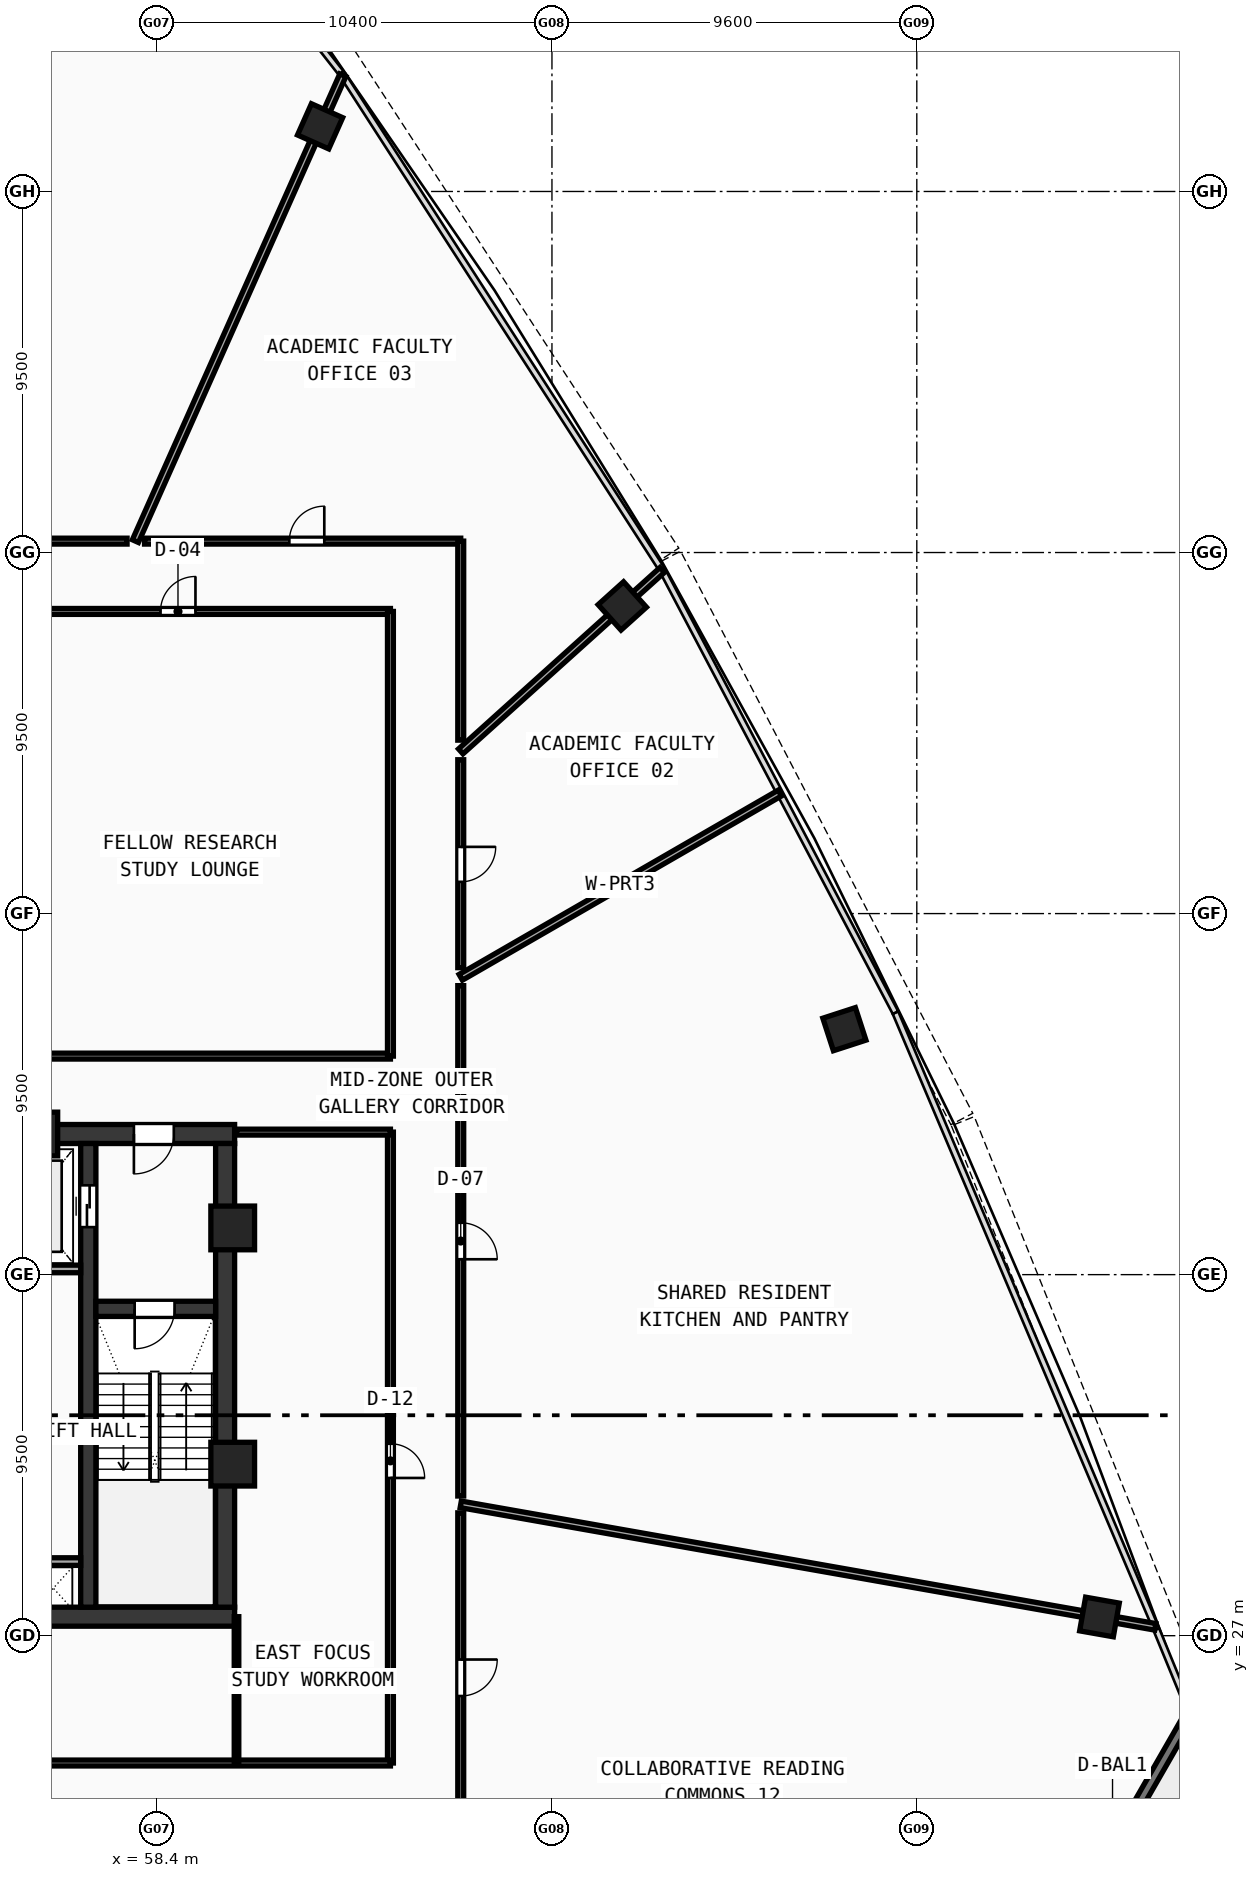
"""IFC4 building model, lengths in metres.
Left out: names, types, materials, properties, quantities, classifications, styles, units other than length and angle.
Written with IfcOpenShell. Run it as: python <this file> out.ifc"""

import sys

from ifc_helpers import new_model, si_unit, direction, frame, frame_2d, origin, origin_with_axes, origin_2d, place, context, subcontext, project, spatial, rectangle, hollow_rectangle, extrude, source, transform, mapped, element, fill, save


model = new_model("IFC4")
c1 = context("Model", 3, precision=1e-05, world=origin(), true_north=direction((0.0, 1.0)))
c2 = subcontext(c1, "Body", "Model", "MODEL_VIEW")
j1 = project(units=[si_unit("LENGTHUNIT", "METRE"), si_unit("PLANEANGLEUNIT", "RADIAN")], contexts=[c1])
p1 = place(None, origin())
s1 = spatial("IfcSite", under=j1, at=p1, CompositionType="ELEMENT")
p2 = place(p1, origin())
s2 = spatial("IfcBuilding", under=s1, at=p2, CompositionType="ELEMENT")
p3 = place(p2, frame((0.0, 0.0, 211.36)))
s3 = spatial("IfcBuildingStorey", under=s2, at=p3, CompositionType="ELEMENT", Elevation=211.36)
p4 = place(p3, frame((35.55, 27.5, 0.0), z_axis=(0.0, 0.0, 1.0), x_axis=(1.0, 0.0, 0.0)))
e1 = element("IfcWall", 1, at=p4, inside=s3, PredefinedType="SHEAR", context=c2, shape_type="SweptSolid", body=[
    extrude(rectangle(XDim=24.9, YDim=0.5, at=frame_2d((12.45, 0.0))), origin(), (0.0, 0.0, 1.0), 3.54),
])
p5 = place(p3, frame((49.2, 40.2, 0.0), z_axis=(0.0, 0.0, 1.0), x_axis=(1.0, 0.0, 0.0)))
e2 = element("IfcWall", 2, at=p5, inside=s3, PredefinedType="SHEAR", context=c2, shape_type="SweptSolid", body=[
    extrude(rectangle(XDim=11.25, YDim=0.5, at=frame_2d((5.625, 0.0))), origin(), (0.0, 0.0, 1.0), 3.54),
])
p6 = place(p5, frame((8.6, 0.0, 0.0)))
e3 = element("IfcOpeningElement", 3, at=p6, cuts=e2, PredefinedType="OPENING", context=c2, shape_type="SweptSolid", body=[
    extrude(rectangle(XDim=1.05, YDim=2.1, at=frame_2d((0.525, 1.05))), frame((0.0, 0.26, 0.0), z_axis=(0.0, -1.0, 0.0), x_axis=(1.0, 0.0, 0.0)), (0.0, 0.0, 1.0), 0.52),
])
p7 = place(p3, frame((60.2, 27.75, 0.0), z_axis=(0.0, 0.0, 1.0), x_axis=(0.0, 1.0, 0.0)))
e4 = element("IfcWall", 4, at=p7, inside=s3, PredefinedType="SHEAR", context=c2, shape_type="SweptSolid", body=[
    extrude(rectangle(XDim=12.2, YDim=0.5, at=frame_2d((6.1, 0.0))), origin(), (0.0, 0.0, 1.0), 3.54),
])
p8 = place(p3, frame((56.6, 27.75, 0.0), z_axis=(0.0, 0.0, 1.0), x_axis=(0.0, 1.0, 0.0)))
e5 = element("IfcWall", 5, at=p8, inside=s3, PredefinedType="SHEAR", context=c2, shape_type="SweptSolid", body=[
    extrude(rectangle(XDim=12.2, YDim=0.4, at=frame_2d((6.1, 0.0))), origin(), (0.0, 0.0, 1.0), 3.54),
])
p9 = place(p8, frame((10.0, 0.0, 0.0)))
e6 = element("IfcOpeningElement", 6, at=p9, cuts=e5, PredefinedType="OPENING", context=c2, shape_type="SweptSolid", body=[
    extrude(rectangle(XDim=1.1, YDim=2.1, at=frame_2d((0.55, 1.05))), frame((0.0, 0.21, 0.0), z_axis=(0.0, -1.0, 0.0), x_axis=(1.0, 0.0, 0.0)), (0.0, 0.0, 1.0), 0.42),
])
p10 = place(p3, frame((56.8, 35.6, 0.0), z_axis=(0.0, 0.0, 1.0), x_axis=(1.0, 0.0, 0.0)))
e7 = element("IfcWall", 7, at=p10, inside=s3, PredefinedType="SHEAR", context=c2, shape_type="SweptSolid", body=[
    extrude(rectangle(XDim=3.15, YDim=0.4, at=frame_2d((1.575, 0.0))), origin(), (0.0, 0.0, 1.0), 3.54),
])
p11 = place(p10, frame((1.02, 0.0, 0.0)))
e8 = element("IfcOpeningElement", 8, at=p11, cuts=e7, PredefinedType="OPENING", context=c2, shape_type="SweptSolid", body=[
    extrude(rectangle(XDim=1.05, YDim=2.1, at=frame_2d((0.525, 1.05))), frame((0.0, 0.21, 0.0), z_axis=(0.0, -1.0, 0.0), x_axis=(1.0, 0.0, 0.0)), (0.0, 0.0, 1.0), 0.42),
])
m1 = source(origin(), c2, "Body", "SweptSolid", [
    extrude(hollow_rectangle(XDim=1.15, YDim=1.15, WallThickness=0.048, at=origin_2d()), origin(), (0.0, 0.0, 1.0), 3.8),
])
for number, where, z_axis, x_axis in (
    (9, (60.4, 31.513, -0.26), (0.0, 0.0, 1.0), (1.0, 0.0, 0.0)),
    (10, (60.4, 37.729, -0.26), (0.0, 0.0, 1.0), (1.0, 0.0, 0.0)),
    (11, (55.219, 40.2, -0.26), (0.0, 0.0, 1.0), (1.0, 0.0, 0.0)),
):
    element("IfcColumn", number, at=place(p3, frame(where, z_axis=z_axis, x_axis=x_axis)), inside=s3, PredefinedType="COLUMN", context=c2, shape_type="MappedRepresentation", body=[
        mapped(m1, transform((0.0, 0.0, 0.0), scale=1.0)),
    ])
m2 = source(origin(), c2, "Body", "SweptSolid", [
    extrude(hollow_rectangle(XDim=0.9, YDim=0.9, WallThickness=0.036, at=origin_2d()), origin(), (0.0, 0.0, 1.0), 3.8),
])
for number, where, z_axis, x_axis in (
    (12, (83.207, 27.492, -0.26), (0.0, 0.0, 1.0), (0.174, 0.985, 0.0)),
    (13, (76.495, 42.958, -0.26), (0.0, 0.0, 1.0), (-0.309, 0.951, 0.0)),
    (14, (70.651, 54.095, -0.26), (0.0, 0.0, 1.0), (-0.669, 0.743, 0.0)),
    (15, (62.699, 66.715, -0.26), (0.0, 0.0, 1.0), (-0.914, 0.407, 0.0)),
):
    element("IfcColumn", number, at=place(p3, frame(where, z_axis=z_axis, x_axis=x_axis)), inside=s3, PredefinedType="COLUMN", context=c2, shape_type="MappedRepresentation", body=[
        mapped(m2, transform((0.0, 0.0, 0.0), scale=1.0)),
    ])
p12 = place(p3, frame((81.466, 17.75, 0.0), z_axis=(0.0, 0.0, 1.0), x_axis=(0.497934125263, 0.867214856249, 0.0)))
e16 = element("IfcWall", 16, at=p12, inside=s3, PredefinedType="STANDARD", context=c2, shape_type="SweptSolid", body=[
    extrude(rectangle(XDim=8.373, YDim=0.26, at=frame_2d((4.186, 0.0))), origin(), (0.0, 0.0, 1.0), 3.54),
])
p13 = place(p12, frame((3.286, 0.0, 0.0)))
e17 = element("IfcOpeningElement", 17, at=p13, cuts=e16, PredefinedType="OPENING", context=c2, shape_type="SweptSolid", body=[
    extrude(rectangle(XDim=1.8, YDim=2.15, at=frame_2d((0.9, 1.075))), frame((0.0, 0.14, 0.0), z_axis=(0.0, -1.0, 0.0), x_axis=(1.0, 0.0, 0.0)), (0.0, 0.0, 1.0), 0.28),
])
p14 = place(p3, frame((53.68, 36.65, 0.0), z_axis=(0.0, 0.0, 1.0), x_axis=(1.0, 0.0, 0.0)))
e18 = element("IfcWall", 18, at=p14, inside=s3, PredefinedType="SOLIDWALL", context=c2, shape_type="SweptSolid", body=[
    extrude(rectangle(XDim=2.72, YDim=0.2, at=frame_2d((1.36, 0.0))), origin(), (0.0, 0.0, 1.0), 3.54),
])
p15 = place(p3, frame((55.12, 28.95, 0.0), z_axis=(0.0, 0.0, 1.0), x_axis=(1.0, 0.0, 0.0)))
e19 = element("IfcWall", 19, at=p15, inside=s3, PredefinedType="SOLIDWALL", context=c2, shape_type="SweptSolid", body=[
    extrude(rectangle(XDim=1.28, YDim=0.2, at=frame_2d((0.64, 0.0))), origin(), (0.0, 0.0, 1.0), 3.54),
])
p16 = place(p3, frame((31.45, 42.25, 0.0), z_axis=(0.0, 0.0, 1.0), x_axis=(1.0, 0.0, 0.0)))
e20 = element("IfcWall", 20, at=p16, inside=s3, PredefinedType="PARTITIONING", context=c2, shape_type="SweptSolid", body=[
    extrude(rectangle(XDim=33.1, YDim=0.155, at=frame_2d((16.55, 0.0))), origin(), (0.0, 0.0, 1.0), 2.89),
])
p17 = place(p3, frame((31.45, 53.95, 0.0), z_axis=(0.0, 0.0, 1.0), x_axis=(1.0, 0.0, 0.0)))
e21 = element("IfcWall", 21, at=p17, inside=s3, PredefinedType="PARTITIONING", context=c2, shape_type="SweptSolid", body=[
    extrude(rectangle(XDim=33.1, YDim=0.155, at=frame_2d((16.55, 0.0))), origin(), (0.0, 0.0, 1.0), 2.89),
])
p18 = place(p17, frame((8.0, 0.0, 0.0)))
e22 = element("IfcOpeningElement", 22, at=p18, cuts=e21, PredefinedType="OPENING", context=c2, shape_type="SweptSolid", body=[
    extrude(rectangle(XDim=0.92, YDim=2.1, at=frame_2d((0.46, 1.05))), frame((0.0, 0.087, 0.0), z_axis=(0.0, -1.0, 0.0), x_axis=(1.0, 0.0, 0.0)), (0.0, 0.0, 1.0), 0.175),
])
p19 = place(p17, frame((27.05, 0.0, 0.0)))
e23 = element("IfcOpeningElement", 23, at=p19, cuts=e21, PredefinedType="OPENING", context=c2, shape_type="SweptSolid", body=[
    extrude(rectangle(XDim=0.92, YDim=2.1, at=frame_2d((0.46, 1.05))), frame((0.0, 0.087, 0.0), z_axis=(0.0, -1.0, 0.0), x_axis=(1.0, 0.0, 0.0)), (0.0, 0.0, 1.0), 0.175),
])
p20 = place(p3, frame((64.55, 42.25, 0.0), z_axis=(0.0, 0.0, 1.0), x_axis=(0.0, 1.0, 0.0)))
e24 = element("IfcWall", 24, at=p20, inside=s3, PredefinedType="PARTITIONING", context=c2, shape_type="SweptSolid", body=[
    extrude(rectangle(XDim=11.7, YDim=0.155, at=frame_2d((5.85, 0.0))), origin(), (0.0, 0.0, 1.0), 2.89),
])
p21 = place(p3, frame((64.55, 23.65, 0.0), z_axis=(0.0, 0.0, 1.0), x_axis=(0.0, 1.0, 0.0)))
e25 = element("IfcWall", 25, at=p21, inside=s3, PredefinedType="PARTITIONING", context=c2, shape_type="SweptSolid", body=[
    extrude(rectangle(XDim=16.6, YDim=0.155, at=frame_2d((8.3, 0.0))), origin(), (0.0, 0.0, 1.0), 2.89),
])
p22 = place(p21, frame((7.5, 0.0, 0.0)))
e26 = element("IfcOpeningElement", 26, at=p22, cuts=e25, PredefinedType="OPENING", context=c2, shape_type="SweptSolid", body=[
    extrude(rectangle(XDim=0.9, YDim=2.08, at=frame_2d((0.45, 1.04))), frame((0.0, 0.087, 0.0), z_axis=(0.0, -1.0, 0.0), x_axis=(1.0, 0.0, 0.0)), (0.0, 0.0, 1.0), 0.175),
])
p23 = place(p3, frame((31.45, 23.65, 0.0), z_axis=(0.0, 0.0, 1.0), x_axis=(1.0, 0.0, 0.0)))
e27 = element("IfcWall", 27, at=p23, inside=s3, PredefinedType="PARTITIONING", context=c2, shape_type="SweptSolid", body=[
    extrude(rectangle(XDim=33.1, YDim=0.155, at=frame_2d((16.55, 0.0))), origin(), (0.0, 0.0, 1.0), 2.89),
])
p24 = place(p23, frame((16.0, 0.0, 0.0)))
e28 = element("IfcOpeningElement", 28, at=p24, cuts=e27, PredefinedType="OPENING", context=c2, shape_type="SweptSolid", body=[
    extrude(rectangle(XDim=0.92, YDim=2.1, at=frame_2d((0.46, 1.05))), frame((0.0, 0.087, 0.0), z_axis=(0.0, -1.0, 0.0), x_axis=(1.0, 0.0, 0.0)), (0.0, 0.0, 1.0), 0.175),
])
p25 = place(p3, frame((60.5, 40.25, 0.0), z_axis=(0.0, 0.0, 1.0), x_axis=(1.0, 0.0, 0.0)))
e29 = element("IfcWall", 29, at=p25, inside=s3, PredefinedType="PARTITIONING", context=c2, shape_type="SweptSolid", body=[
    extrude(rectangle(XDim=4.05, YDim=0.155, at=frame_2d((2.025, 0.0))), origin(), (0.0, 0.0, 1.0), 3.54),
])
p26 = place(p3, frame((60.5, 23.65, 0.0), z_axis=(0.0, 0.0, 1.0), x_axis=(0.0, 1.0, 0.0)))
e30 = element("IfcWall", 30, at=p26, inside=s3, PredefinedType="PARTITIONING", context=c2, shape_type="SweptSolid", body=[
    extrude(rectangle(XDim=3.85, YDim=0.12, at=frame_2d((1.925, 0.0))), origin(), (0.0, 0.0, 1.0), 3.14),
])
p27 = place(p3, frame((66.4, 44.323, 0.0), z_axis=(0.0, 0.0, 1.0), x_axis=(0.866029151995, 0.499993507853, 0.0)))
e31 = element("IfcWall", 31, at=p27, inside=s3, PredefinedType="PARTITIONING", context=c2, shape_type="SweptSolid", body=[
    extrude(rectangle(XDim=9.694, YDim=0.175, at=frame_2d((4.847, 0.0))), origin(), (0.0, 0.0, 1.0), 2.89),
])
p28 = place(p3, frame((66.4, 50.267, 0.0), z_axis=(0.0, 0.0, 1.0), x_axis=(0.743146095384, 0.669129195982, 0.0)))
e32 = element("IfcWall", 32, at=p28, inside=s3, PredefinedType="PARTITIONING", context=c2, shape_type="SweptSolid", body=[
    extrude(rectangle(XDim=7.135, YDim=0.175, at=frame_2d((3.567, 0.0))), origin(), (0.0, 0.0, 1.0), 2.89),
])
p29 = place(p3, frame((57.84, 55.8, 0.0), z_axis=(0.0, 0.0, 1.0), x_axis=(0.406732574237, 0.913547269196, 0.0)))
e33 = element("IfcWall", 33, at=p29, inside=s3, PredefinedType="PARTITIONING", context=c2, shape_type="SweptSolid", body=[
    extrude(rectangle(XDim=13.419, YDim=0.175, at=frame_2d((6.709, 0.0))), origin(), (0.0, 0.0, 1.0), 2.89),
])
p30 = place(p3, frame((66.4, 30.456, 0.0), z_axis=(0.0, 0.0, 1.0), x_axis=(0.984808051039, -0.173646487465, 0.0)))
e34 = element("IfcWall", 34, at=p30, inside=s3, PredefinedType="PARTITIONING", context=c2, shape_type="SweptSolid", body=[
    extrude(rectangle(XDim=18.557, YDim=0.175, at=frame_2d((9.279, 0.0))), origin(), (0.0, 0.0, 1.0), 2.89),
])
p31 = place(p3, frame((52.391, 55.8, 0.0), z_axis=(0.0, 0.0, 1.0), x_axis=(1.0, 0.0, 0.0)))
e35 = element("IfcWall", 35, at=p31, inside=s3, PredefinedType="PARTITIONING", context=c2, shape_type="SweptSolid", body=[
    extrude(rectangle(XDim=5.229, YDim=0.155, at=frame_2d((2.614, 0.0))), origin(), (0.0, 0.0, 1.0), 2.89),
])
p32 = place(p3, frame((58.08, 55.8, 0.0), z_axis=(0.0, 0.0, 1.0), x_axis=(1.0, 0.0, 0.0)))
e36 = element("IfcWall", 36, at=p32, inside=s3, PredefinedType="PARTITIONING", context=c2, shape_type="SweptSolid", body=[
    extrude(rectangle(XDim=8.32, YDim=0.155, at=frame_2d((4.16, 0.0))), origin(), (0.0, 0.0, 1.0), 3.14),
])
p33 = place(p32, frame((3.809, 0.0, 0.0)))
e37 = element("IfcOpeningElement", 37, at=p33, cuts=e36, PredefinedType="OPENING", context=c2, shape_type="SweptSolid", body=[
    extrude(rectangle(XDim=0.92, YDim=2.1, at=frame_2d((0.46, 1.05))), frame((0.0, 0.087, 0.0), z_axis=(0.0, -1.0, 0.0), x_axis=(1.0, 0.0, 0.0)), (0.0, 0.0, 1.0), 0.175),
])
p34 = place(p3, frame((66.4, 55.8, 0.0), z_axis=(0.0, 0.0, 1.0), x_axis=(0.0, -1.0, 0.0)))
e38 = element("IfcWall", 38, at=p34, inside=s3, PredefinedType="PARTITIONING", context=c2, shape_type="SweptSolid", body=[
    extrude(rectangle(XDim=5.237, YDim=0.155, at=frame_2d((2.618, 0.0))), origin(), (0.0, 0.0, 1.0), 3.54),
])
p35 = place(p3, frame((66.4, 50.048, 0.0), z_axis=(0.0, 0.0, 1.0), x_axis=(0.0, -1.0, 0.0)))
e39 = element("IfcWall", 39, at=p35, inside=s3, PredefinedType="PARTITIONING", context=c2, shape_type="SweptSolid", body=[
    extrude(rectangle(XDim=5.47, YDim=0.155, at=frame_2d((2.735, 0.0))), origin(), (0.0, 0.0, 1.0), 2.89),
])
p36 = place(p35, frame((2.292, 0.0, 0.0)))
e40 = element("IfcOpeningElement", 40, at=p36, cuts=e39, PredefinedType="OPENING", context=c2, shape_type="SweptSolid", body=[
    extrude(rectangle(XDim=0.92, YDim=2.1, at=frame_2d((0.46, 1.05))), frame((0.0, 0.087, 0.0), z_axis=(0.0, -1.0, 0.0), x_axis=(1.0, 0.0, 0.0)), (0.0, 0.0, 1.0), 0.175),
])
p37 = place(p3, frame((66.4, 44.104, 0.0), z_axis=(0.0, 0.0, 1.0), x_axis=(0.0, -1.0, 0.0)))
e41 = element("IfcWall", 41, at=p37, inside=s3, PredefinedType="PARTITIONING", context=c2, shape_type="SweptSolid", body=[
    extrude(rectangle(XDim=13.428, YDim=0.155, at=frame_2d((6.714, 0.0))), origin(), (0.0, 0.0, 1.0), 2.89),
])
p38 = place(p37, frame((6.239, 0.0, 0.0)))
e42 = element("IfcOpeningElement", 42, at=p38, cuts=e41, PredefinedType="OPENING", context=c2, shape_type="SweptSolid", body=[
    extrude(rectangle(XDim=0.96, YDim=2.12, at=frame_2d((0.48, 1.06))), frame((0.0, 0.087, 0.0), z_axis=(0.0, -1.0, 0.0), x_axis=(1.0, 0.0, 0.0)), (0.0, 0.0, 1.0), 0.175),
])
p39 = place(p3, frame((66.4, 30.232, 0.0), z_axis=(0.0, 0.0, 1.0), x_axis=(0.0, -1.0, 0.0)))
e43 = element("IfcWall", 43, at=p39, inside=s3, PredefinedType="PARTITIONING", context=c2, shape_type="SweptSolid", body=[
    extrude(rectangle(XDim=8.432, YDim=0.155, at=frame_2d((4.216, 0.0))), origin(), (0.0, 0.0, 1.0), 3.14),
])
p40 = place(p39, frame((3.859, 0.0, 0.0)))
e44 = element("IfcOpeningElement", 44, at=p40, cuts=e43, PredefinedType="OPENING", context=c2, shape_type="SweptSolid", body=[
    extrude(rectangle(XDim=0.96, YDim=2.12, at=frame_2d((0.48, 1.06))), frame((0.0, 0.087, 0.0), z_axis=(0.0, -1.0, 0.0), x_axis=(1.0, 0.0, 0.0)), (0.0, 0.0, 1.0), 0.175),
])
m3 = source(origin(), c2, "Body", "SweptSolid", [
    extrude(rectangle(XDim=1.05, YDim=2.1, at=frame_2d((0.525, 1.05))), frame((0.0, 0.025, 0.0), z_axis=(0.0, -1.0, 0.0), x_axis=(1.0, 0.0, 0.0)), (0.0, 0.0, 1.0), 0.05),
])
p41 = place(p11, frame((1.05, 0.0, 0.0), z_axis=(0.0, 0.0, 1.0), x_axis=(-1.0, 0.0, 0.0)))
e45 = element("IfcDoor", 45, at=p41, inside=s3, OperationType="SINGLE_SWING_RIGHT", PredefinedType="DOOR", context=c2, shape_type="MappedRepresentation", body=[
    mapped(m3, transform((0.0, 0.0, 0.0), scale=1.0)),
])
fill(e8, e45)
p42 = place(p6, frame((1.05, 0.0, 0.0), z_axis=(0.0, 0.0, 1.0), x_axis=(-1.0, 0.0, 0.0)))
e46 = element("IfcDoor", 46, at=p42, inside=s3, OperationType="SINGLE_SWING_RIGHT", PredefinedType="DOOR", context=c2, shape_type="MappedRepresentation", body=[
    mapped(m3, transform((0.0, 0.0, 0.0), scale=1.0)),
])
fill(e3, e46)
m4 = source(origin(), c2, "Body", "SweptSolid", [
    extrude(rectangle(XDim=1.1, YDim=2.1, at=frame_2d((0.55, 1.05))), frame((0.0, 0.025, 0.0), z_axis=(0.0, -1.0, 0.0), x_axis=(1.0, 0.0, 0.0)), (0.0, 0.0, 1.0), 0.05),
])
p43 = place(p9, origin_with_axes())
e47 = element("IfcDoor", 47, at=p43, inside=s3, OperationType="DOUBLE_DOOR_SLIDING", PredefinedType="DOOR", context=c2, shape_type="MappedRepresentation", body=[
    mapped(m4, transform((0.0, 0.0, 0.0), scale=1.0)),
])
fill(e6, e47)
m5 = source(origin(), c2, "Body", "SweptSolid", [
    extrude(rectangle(XDim=0.92, YDim=2.1, at=frame_2d((0.46, 1.05))), frame((0.0, 0.025, 0.0), z_axis=(0.0, -1.0, 0.0), x_axis=(1.0, 0.0, 0.0)), (0.0, 0.0, 1.0), 0.05),
])
p44 = place(p19, origin_with_axes())
e48 = element("IfcDoor", 48, at=p44, inside=s3, OperationType="SINGLE_SWING_RIGHT", PredefinedType="DOOR", context=c2, shape_type="MappedRepresentation", body=[
    mapped(m5, transform((0.0, 0.0, 0.0), scale=1.0)),
])
fill(e23, e48)
m6 = source(origin(), c2, "Body", "SweptSolid", [
    extrude(rectangle(XDim=0.9, YDim=2.08, at=frame_2d((0.45, 1.04))), frame((0.0, 0.025, 0.0), z_axis=(0.0, -1.0, 0.0), x_axis=(1.0, 0.0, 0.0)), (0.0, 0.0, 1.0), 0.05),
])
p45 = place(p22, frame((0.9, 0.0, 0.0), z_axis=(0.0, 0.0, 1.0), x_axis=(-1.0, 0.0, 0.0)))
e49 = element("IfcDoor", 49, at=p45, inside=s3, OperationType="SINGLE_SWING_RIGHT", PredefinedType="DOOR", context=c2, shape_type="MappedRepresentation", body=[
    mapped(m6, transform((0.0, 0.0, 0.0), scale=1.0)),
])
fill(e26, e49)
m7 = source(origin(), c2, "Body", "SweptSolid", [
    extrude(rectangle(XDim=0.96, YDim=2.12, at=frame_2d((0.48, 1.06))), frame((0.0, 0.025, 0.0), z_axis=(0.0, -1.0, 0.0), x_axis=(1.0, 0.0, 0.0)), (0.0, 0.0, 1.0), 0.05),
])
p46 = place(p38, origin_with_axes())
e50 = element("IfcDoor", 50, at=p46, inside=s3, OperationType="SINGLE_SWING_RIGHT", PredefinedType="DOOR", context=c2, shape_type="MappedRepresentation", body=[
    mapped(m7, transform((0.0, 0.0, 0.0), scale=1.0)),
])
fill(e42, e50)
p47 = place(p36, origin_with_axes())
e51 = element("IfcDoor", 51, at=p47, inside=s3, OperationType="SINGLE_SWING_LEFT", PredefinedType="DOOR", context=c2, shape_type="MappedRepresentation", body=[
    mapped(m5, transform((0.0, 0.0, 0.0), scale=1.0)),
])
fill(e40, e51)
p48 = place(p33, origin_with_axes())
e52 = element("IfcDoor", 52, at=p48, inside=s3, OperationType="SINGLE_SWING_RIGHT", PredefinedType="DOOR", context=c2, shape_type="MappedRepresentation", body=[
    mapped(m5, transform((0.0, 0.0, 0.0), scale=1.0)),
])
fill(e37, e52)
p49 = place(p40, origin_with_axes())
e53 = element("IfcDoor", 53, at=p49, inside=s3, OperationType="SINGLE_SWING_LEFT", PredefinedType="DOOR", context=c2, shape_type="MappedRepresentation", body=[
    mapped(m7, transform((0.0, 0.0, 0.0), scale=1.0)),
])
fill(e44, e53)
save(model, sys.argv[1])
